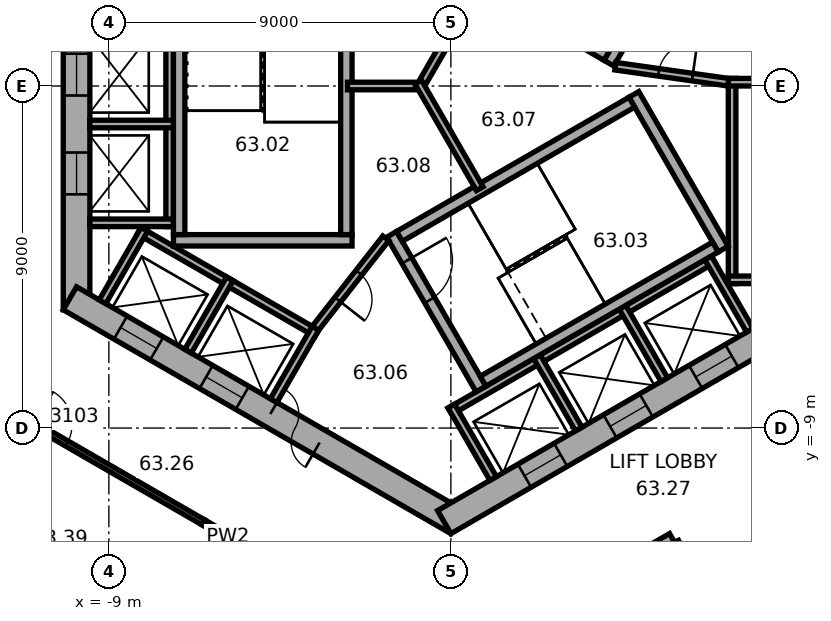
"""IFC4 building model, lengths in metres.
Left out: names, types, materials, properties, quantities, classifications, styles, units other than length and angle.
Written with IfcOpenShell. Run it as: python <this file> out.ifc"""

import sys

from ifc_helpers import new_model, si_unit, direction, frame, frame_2d, origin, place, context, subcontext, project, spatial, rectangle, extrude, element, fill, save


model = new_model("IFC4")
c1 = context("Model", 3, precision=1e-05, world=origin(), true_north=direction((0.0, 1.0)))
c2 = subcontext(c1, "Body", "Model", "MODEL_VIEW")
j1 = project(units=[si_unit("LENGTHUNIT", "METRE"), si_unit("PLANEANGLEUNIT", "RADIAN")], contexts=[c1])
p1 = place(None, origin())
s1 = spatial("IfcSite", under=j1, at=p1, CompositionType="ELEMENT")
p2 = place(p1, origin())
s2 = spatial("IfcBuilding", under=s1, at=p2, CompositionType="ELEMENT")
p3 = place(p2, frame((0.0, 0.0, 255.0)))
s3 = spatial("IfcBuildingStorey", under=s2, at=p3, CompositionType="ELEMENT", Elevation=255.0)
p4 = place(p3, frame((-9.85, 5.889, 0.0), z_axis=(0.0, 0.0, 1.0), x_axis=(0.0, -1.0, 0.0)))
e1 = element("IfcWall", 1, at=p4, inside=s3, PredefinedType="SHEAR", context=c2, shape_type="SweptSolid", body=[
    extrude(rectangle(XDim=11.778, YDim=0.7, at=frame_2d((5.889, 0.0))), origin(), (0.0, 0.0, 1.0), 4.8),
])
p5 = place(p4, frame((5.039, 0.0, 0.0)))
e2 = element("IfcOpeningElement", 2, at=p5, cuts=e1, PredefinedType="OPENING", context=c2, shape_type="SweptSolid", body=[
    extrude(rectangle(XDim=1.1, YDim=2.1, at=frame_2d((0.55, 1.05))), frame((0.0, 0.36, 0.0), z_axis=(0.0, -1.0, 0.0), x_axis=(1.0, 0.0, 0.0)), (0.0, 0.0, 1.0), 0.72),
])
p6 = place(p4, frame((7.639, 0.0, 0.0)))
e3 = element("IfcOpeningElement", 3, at=p6, cuts=e1, PredefinedType="OPENING", context=c2, shape_type="SweptSolid", body=[
    extrude(rectangle(XDim=1.1, YDim=2.1, at=frame_2d((0.55, 1.05))), frame((0.0, 0.36, 0.0), z_axis=(0.0, -1.0, 0.0), x_axis=(1.0, 0.0, 0.0)), (0.0, 0.0, 1.0), 0.72),
])
p7 = place(p3, frame((-10.025, -5.586, 0.0), z_axis=(0.0, 0.0, 1.0), x_axis=(0.866026453023, -0.499998182661, 0.0)))
e4 = element("IfcWall", 4, at=p7, inside=s3, PredefinedType="SHEAR", context=c2, shape_type="SweptSolid", body=[
    extrude(rectangle(XDim=11.778, YDim=0.7, at=frame_2d((5.889, 0.0))), origin(), (0.0, 0.0, 1.0), 4.8),
])
p8 = place(p7, frame((6.089, 0.0, 0.0)))
e5 = element("IfcOpeningElement", 5, at=p8, cuts=e4, PredefinedType="OPENING", context=c2, shape_type="SweptSolid", body=[
    extrude(rectangle(XDim=1.5, YDim=2.1, at=frame_2d((0.75, 1.05))), frame((0.0, 0.36, 0.0), z_axis=(0.0, -1.0, 0.0), x_axis=(1.0, 0.0, 0.0)), (0.0, 0.0, 1.0), 0.72),
])
p9 = place(p7, frame((1.539, 0.0, 0.0)))
e6 = element("IfcOpeningElement", 6, at=p9, cuts=e4, PredefinedType="OPENING", context=c2, shape_type="SweptSolid", body=[
    extrude(rectangle(XDim=1.1, YDim=2.1, at=frame_2d((0.55, 1.05))), frame((0.0, 0.36, 0.0), z_axis=(0.0, -1.0, 0.0), x_axis=(1.0, 0.0, 0.0)), (0.0, 0.0, 1.0), 0.72),
])
p10 = place(p7, frame((4.139, 0.0, 0.0)))
e7 = element("IfcOpeningElement", 7, at=p10, cuts=e4, PredefinedType="OPENING", context=c2, shape_type="SweptSolid", body=[
    extrude(rectangle(XDim=1.1, YDim=2.1, at=frame_2d((0.55, 1.05))), frame((0.0, 0.36, 0.0), z_axis=(0.0, -1.0, 0.0), x_axis=(1.0, 0.0, 0.0)), (0.0, 0.0, 1.0), 0.72),
])
p11 = place(p3, frame((-0.175, -11.475, 0.0), z_axis=(0.0, 0.0, 1.0), x_axis=(0.866026453023, 0.499998182661, 0.0)))
e8 = element("IfcWall", 8, at=p11, inside=s3, PredefinedType="SHEAR", context=c2, shape_type="SweptSolid", body=[
    extrude(rectangle(XDim=11.778, YDim=0.7, at=frame_2d((5.889, 0.0))), origin(), (0.0, 0.0, 1.0), 4.8),
])
p12 = place(p11, frame((2.439, 0.0, 0.0)))
e9 = element("IfcOpeningElement", 9, at=p12, cuts=e8, PredefinedType="OPENING", context=c2, shape_type="SweptSolid", body=[
    extrude(rectangle(XDim=1.1, YDim=2.1, at=frame_2d((0.55, 1.05))), frame((0.0, 0.36, 0.0), z_axis=(0.0, -1.0, 0.0), x_axis=(1.0, 0.0, 0.0)), (0.0, 0.0, 1.0), 0.72),
])
p13 = place(p11, frame((5.039, 0.0, 0.0)))
e10 = element("IfcOpeningElement", 10, at=p13, cuts=e8, PredefinedType="OPENING", context=c2, shape_type="SweptSolid", body=[
    extrude(rectangle(XDim=1.1, YDim=2.1, at=frame_2d((0.55, 1.05))), frame((0.0, 0.36, 0.0), z_axis=(0.0, -1.0, 0.0), x_axis=(1.0, 0.0, 0.0)), (0.0, 0.0, 1.0), 0.72),
])
p14 = place(p11, frame((7.639, 0.0, 0.0)))
e11 = element("IfcOpeningElement", 11, at=p14, cuts=e8, PredefinedType="OPENING", context=c2, shape_type="SweptSolid", body=[
    extrude(rectangle(XDim=1.1, YDim=2.1, at=frame_2d((0.55, 1.05))), frame((0.0, 0.36, 0.0), z_axis=(0.0, -1.0, 0.0), x_axis=(1.0, 0.0, 0.0)), (0.0, 0.0, 1.0), 0.72),
])
p15 = place(p3, frame((7.4, -5.2, 0.0), z_axis=(0.0, 0.0, 1.0), x_axis=(0.0, 1.0, 0.0)))
e12 = element("IfcWall", 12, at=p15, inside=s3, PredefinedType="PARTITIONING", context=c2, shape_type="SweptSolid", body=[
    extrude(rectangle(XDim=5.4, YDim=0.2, at=frame_2d((2.7, 0.0))), origin(), (0.0, 0.0, 1.0), 4.52),
])
for number, where, z_axis, x_axis in (
    (13, (7.3, -5.1, 0.0), (0.0, 0.0, 1.0), (1.0, 0.0, 0.0)),
    (14, (7.3, 0.1, 0.0), (0.0, 0.0, 1.0), (1.0, 0.0, 0.0)),
):
    element("IfcWall", number, at=place(p3, frame(where, z_axis=z_axis, x_axis=x_axis)), inside=s3, PredefinedType="PARTITIONING", context=c2, shape_type="SweptSolid", body=[
        extrude(rectangle(XDim=2.2, YDim=0.2, at=frame_2d((1.1, 0.0))), origin(), (0.0, 0.0, 1.0), 4.52),
    ])
p16 = place(p3, frame((-7.4, 4.3, 0.0), z_axis=(0.0, 0.0, 1.0), x_axis=(0.0, -1.0, 0.0)))
e15 = element("IfcWall", 15, at=p16, inside=s3, PredefinedType="PARTITIONING", context=c2, shape_type="SweptSolid", body=[
    extrude(rectangle(XDim=8.0, YDim=0.2, at=frame_2d((4.0, 0.0))), origin(), (0.0, 0.0, 1.0), 4.52),
])
for number, where, z_axis, x_axis in (
    (16, (-7.3, -1.0, 0.0), (0.0, 0.0, 1.0), (-1.0, 0.0, 0.0)),
    (17, (-7.3, -3.6, 0.0), (0.0, 0.0, 1.0), (-1.0, 0.0, 0.0)),
):
    element("IfcWall", number, at=place(p3, frame(where, z_axis=z_axis, x_axis=x_axis)), inside=s3, PredefinedType="PARTITIONING", context=c2, shape_type="SweptSolid", body=[
        extrude(rectangle(XDim=2.2, YDim=0.2, at=frame_2d((1.1, 0.0))), origin(), (0.0, 0.0, 1.0), 4.52),
    ])
p17 = place(p3, frame((-8.203, -3.809, 0.0), z_axis=(0.0, 0.0, 1.0), x_axis=(0.866028230842, -0.499995103361, 0.0)))
e18 = element("IfcWall", 18, at=p17, inside=s3, PredefinedType="PARTITIONING", context=c2, shape_type="SweptSolid", body=[
    extrude(rectangle(XDim=5.4, YDim=0.2, at=frame_2d((2.7, 0.0))), origin(), (0.0, 0.0, 1.0), 4.52),
])
for number, where, z_axis, x_axis in (
    (19, (-8.067, -3.772, 0.0), (0.0, 0.0, 1.0), (-0.5, -0.866, 0.0)),
    (20, (-5.815, -5.072, 0.0), (0.0, 0.0, 1.0), (-0.5, -0.866, 0.0)),
):
    element("IfcWall", number, at=place(p3, frame(where, z_axis=z_axis, x_axis=x_axis)), inside=s3, PredefinedType="PARTITIONING", context=c2, shape_type="SweptSolid", body=[
        extrude(rectangle(XDim=2.2, YDim=0.2, at=frame_2d((1.1, 0.0))), origin(), (0.0, 0.0, 1.0), 4.52),
    ])
p18 = place(p3, frame((-3.563, -6.372, 0.0), z_axis=(0.0, 0.0, 1.0), x_axis=(-0.499994660107, -0.866028486751, 0.0)))
e21 = element("IfcWall", 21, at=p18, inside=s3, PredefinedType="PARTITIONING", context=c2, shape_type="SweptSolid", body=[
    extrude(rectangle(XDim=2.2, YDim=0.2, at=frame_2d((1.1, 0.0))), origin(), (0.0, 0.0, 1.0), 4.52),
])
p19 = place(p3, frame((-0.024, -8.559, 0.0), z_axis=(0.0, 0.0, 1.0), x_axis=(0.866026010844, 0.49999894854, 0.0)))
e22 = element("IfcWall", 22, at=p19, inside=s3, PredefinedType="PARTITIONING", context=c2, shape_type="SweptSolid", body=[
    extrude(rectangle(XDim=8.0, YDim=0.2, at=frame_2d((4.0, 0.0))), origin(), (0.0, 0.0, 1.0), 4.52),
])
for number, where, z_axis, x_axis in (
    (23, (0.013, -8.422, 0.0), (0.0, 0.0, 1.0), (0.5, -0.866, 0.0)),
    (24, (2.264, -7.122, 0.0), (0.0, 0.0, 1.0), (0.5, -0.866, 0.0)),
    (25, (4.516, -5.822, 0.0), (0.0, 0.0, 1.0), (0.5, -0.866, 0.0)),
    (26, (6.768, -4.522, 0.0), (0.0, 0.0, 1.0), (0.5, -0.866, 0.0)),
):
    element("IfcWall", number, at=place(p3, frame(where, z_axis=z_axis, x_axis=x_axis)), inside=s3, PredefinedType="PARTITIONING", context=c2, shape_type="SweptSolid", body=[
        extrude(rectangle(XDim=2.2, YDim=0.2, at=frame_2d((1.1, 0.0))), origin(), (0.0, 0.0, 1.0), 4.52),
    ])
p20 = place(p3, frame((4.158, 0.602, 0.0), z_axis=(0.0, 0.0, 1.0), x_axis=(0.499977259774, 0.866038532462, 0.0)))
e27 = element("IfcWall", 27, at=p20, inside=s3, PredefinedType="SHEAR", context=c2, shape_type="SweptSolid", body=[
    extrude(rectangle(XDim=4.7, YDim=0.3, at=frame_2d((2.35, 0.0))), origin(), (0.0, 0.0, 1.0), 4.52),
])
p21 = place(p20, frame((0.8, 0.0, 0.0)))
e28 = element("IfcOpeningElement", 28, at=p21, cuts=e27, PredefinedType="OPENING", context=c2, shape_type="SweptSolid", body=[
    extrude(rectangle(XDim=1.2, YDim=2.1, at=frame_2d((0.6, 1.05))), frame((0.0, 0.16, 0.0), z_axis=(0.0, -1.0, 0.0), x_axis=(1.0, 0.0, 0.0)), (0.0, 0.0, 1.0), 0.32),
])
p22 = place(p3, frame((4.103, 0.807, 0.0), z_axis=(0.0, 0.0, 1.0), x_axis=(-0.866027801685, 0.499995846692, 0.0)))
e29 = element("IfcWall", 29, at=p22, inside=s3, PredefinedType="SHEAR", context=c2, shape_type="SweptSolid", body=[
    extrude(rectangle(XDim=7.06, YDim=0.3, at=frame_2d((3.53, 0.0))), origin(), (0.0, 0.0, 1.0), 4.52),
])
p23 = place(p3, frame((-2.6, -4.06, 0.0), z_axis=(0.0, 0.0, 1.0), x_axis=(-1.0, 0.0, 0.0)))
e30 = element("IfcWall", 30, at=p23, inside=s3, PredefinedType="SHEAR", context=c2, shape_type="SweptSolid", body=[
    extrude(rectangle(XDim=4.7, YDim=0.3, at=frame_2d((2.35, 0.0))), origin(), (0.0, 0.0, 1.0), 4.52),
])
for number, where, z_axis, x_axis in (
    (31, (-2.75, 3.15, 0.0), (0.0, 0.0, 1.0), (0.0, -1.0, 0.0)),
    (32, (-7.15, 3.15, 0.0), (0.0, 0.0, 1.0), (0.0, -1.0, 0.0)),
):
    element("IfcWall", number, at=place(p3, frame(where, z_axis=z_axis, x_axis=x_axis)), inside=s3, PredefinedType="SHEAR", context=c2, shape_type="SweptSolid", body=[
        extrude(rectangle(XDim=7.06, YDim=0.3, at=frame_2d((3.53, 0.0))), origin(), (0.0, 0.0, 1.0), 4.52),
    ])
p24 = place(p3, frame((-1.558, -3.902, 0.0), z_axis=(0.0, 0.0, 1.0), x_axis=(0.499977259774, -0.866038532462, 0.0)))
e33 = element("IfcWall", 33, at=p24, inside=s3, PredefinedType="SHEAR", context=c2, shape_type="SweptSolid", body=[
    extrude(rectangle(XDim=4.7, YDim=0.3, at=frame_2d((2.35, 0.0))), origin(), (0.0, 0.0, 1.0), 4.52),
])
p25 = place(p24, frame((0.8, 0.0, 0.0)))
e34 = element("IfcOpeningElement", 34, at=p25, cuts=e33, PredefinedType="OPENING", context=c2, shape_type="SweptSolid", body=[
    extrude(rectangle(XDim=1.2, YDim=2.1, at=frame_2d((0.6, 1.05))), frame((0.0, 0.16, 0.0), z_axis=(0.0, -1.0, 0.0), x_axis=(1.0, 0.0, 0.0)), (0.0, 0.0, 1.0), 0.32),
])
p26 = place(p3, frame((4.816, -0.222, 0.0), z_axis=(0.0, 0.0, 1.0), x_axis=(0.499977259774, -0.866038532462, 0.0)))
e35 = element("IfcWall", 35, at=p26, inside=s3, PredefinedType="SHEAR", context=c2, shape_type="SweptSolid", body=[
    extrude(rectangle(XDim=4.7, YDim=0.3, at=frame_2d((2.35, 0.0))), origin(), (0.0, 0.0, 1.0), 4.52),
])
for number, where, z_axis, x_axis in (
    (36, (-1.353, -3.957, 0.0), (0.0, 0.0, 1.0), (0.866, 0.5, 0.0)),
    (37, (0.847, -7.767, 0.0), (0.0, 0.0, 1.0), (0.866, 0.5, 0.0)),
):
    element("IfcWall", number, at=place(p3, frame(where, z_axis=z_axis, x_axis=x_axis)), inside=s3, PredefinedType="SHEAR", context=c2, shape_type="SweptSolid", body=[
        extrude(rectangle(XDim=7.06, YDim=0.3, at=frame_2d((3.53, 0.0))), origin(), (0.0, 0.0, 1.0), 4.52),
    ])
p27 = place(p3, frame((4.327, 0.521, 0.0), z_axis=(0.0, 0.0, 1.0), x_axis=(0.990124376366, -0.14019172346, 0.0)))
e38 = element("IfcWall", 38, at=p27, inside=s3, PredefinedType="PARTITIONING", context=c2, shape_type="SweptSolid", body=[
    extrude(rectangle(XDim=3.002, YDim=0.2, at=frame_2d((1.501, 0.0))), origin(), (0.0, 0.0, 1.0), 4.52),
])
p28 = place(p27, frame((1.15, 0.0, 0.0)))
e39 = element("IfcOpeningElement", 39, at=p28, cuts=e38, PredefinedType="OPENING", context=c2, shape_type="SweptSolid", body=[
    extrude(rectangle(XDim=0.9, YDim=2.1, at=frame_2d((0.45, 1.05))), frame((0.0, 0.11, 0.0), z_axis=(0.0, -1.0, 0.0), x_axis=(1.0, 0.0, 0.0)), (0.0, 0.0, 1.0), 0.22),
])
p29 = place(p3, frame((-1.712, -4.008, 0.0), z_axis=(0.0, 0.0, 1.0), x_axis=(-0.616549420702, -0.787316208287, 0.0)))
e40 = element("IfcWall", 40, at=p29, inside=s3, PredefinedType="PARTITIONING", context=c2, shape_type="SweptSolid", body=[
    extrude(rectangle(XDim=3.002, YDim=0.2, at=frame_2d((1.501, 0.0))), origin(), (0.0, 0.0, 1.0), 4.52),
])
p30 = place(p29, frame((1.15, 0.0, 0.0)))
e41 = element("IfcOpeningElement", 41, at=p30, cuts=e40, PredefinedType="OPENING", context=c2, shape_type="SweptSolid", body=[
    extrude(rectangle(XDim=0.9, YDim=2.1, at=frame_2d((0.45, 1.05))), frame((0.0, 0.11, 0.0), z_axis=(0.0, -1.0, 0.0), x_axis=(1.0, 0.0, 0.0)), (0.0, 0.0, 1.0), 0.22),
])
p31 = place(p3, frame((-0.68, 0.0, 0.0), z_axis=(0.0, 0.0, 1.0), x_axis=(-1.0, 0.0, 0.0)))
e42 = element("IfcWall", 42, at=p31, inside=s3, PredefinedType="PARTITIONING", context=c2, shape_type="SweptSolid", body=[
    extrude(rectangle(XDim=2.04, YDim=0.2, at=frame_2d((1.02, 0.0))), origin(), (0.0, 0.0, 1.0), 4.52),
])
for number, where, z_axis, x_axis in (
    (43, (-0.86, -0.104, 0.0), (0.0, 0.0, 1.0), (0.5, 0.866, 0.0)),
    (44, (-0.86, 0.104, 0.0), (0.0, 0.0, 1.0), (0.5, -0.866, 0.0)),
):
    element("IfcWall", number, at=place(p3, frame(where, z_axis=z_axis, x_axis=x_axis)), inside=s3, PredefinedType="PARTITIONING", context=c2, shape_type="SweptSolid", body=[
        extrude(rectangle(XDim=3.24, YDim=0.2, at=frame_2d((1.62, 0.0))), origin(), (0.0, 0.0, 1.0), 4.52),
    ])
p32 = place(p3, frame((-6.975, -16.411, 0.0), z_axis=(0.0, 0.0, 1.0), x_axis=(-0.866045613381, 0.499964994319, 0.0)))
e45 = element("IfcWall", 45, at=p32, inside=s3, PredefinedType="SOLIDWALL", context=c2, shape_type="SweptSolid", body=[
    extrude(rectangle(XDim=9.265, YDim=0.25, at=frame_2d((4.633, 0.0))), origin(), (0.0, 0.0, 1.0), 4.52),
])
p33 = place(p3, frame((7.799, -15.934, 0.0), z_axis=(0.0, 0.0, 1.0), x_axis=(-0.439688100098, 0.898150530052, 0.0)))
e46 = element("IfcWall", 46, at=p33, inside=s3, PredefinedType="SOLIDWALL", context=c2, shape_type="SweptSolid", body=[
    extrude(rectangle(XDim=4.369, YDim=0.25, at=frame_2d((2.185, 0.0))), origin(), (0.0, 0.0, 1.0), 3.6),
])
p34 = place(p3, frame((3.889, -12.997, 0.0), z_axis=(0.0, 0.0, 1.0), x_axis=(0.866026623601, 0.49999788721, 0.0)))
e47 = element("IfcWall", 47, at=p34, inside=s3, PredefinedType="SOLIDWALL", context=c2, shape_type="SweptSolid", body=[
    extrude(rectangle(XDim=2.225, YDim=0.25, at=frame_2d((1.113, 0.0))), origin(), (0.0, 0.0, 1.0), 4.52),
])
p35 = place(p3, frame((-6.513, -11.481, 0.0), z_axis=(0.0, 0.0, 1.0), x_axis=(0.866009279501, -0.500027927039, 0.0)))
e48 = element("IfcWall", 48, at=p35, inside=s3, PredefinedType="PARTITIONING", context=c2, shape_type="SweptSolid", body=[
    extrude(rectangle(XDim=1.499, YDim=0.15, at=frame_2d((0.75, 0.0))), origin(), (0.0, 0.0, 1.0), 4.52),
])
p36 = place(p3, frame((-11.186, -8.784, 0.0), z_axis=(0.0, 0.0, 1.0), x_axis=(0.866020546064, -0.500008413725, 0.0)))
e49 = element("IfcWall", 49, at=p36, inside=s3, PredefinedType="PARTITIONING", context=c2, shape_type="SweptSolid", body=[
    extrude(rectangle(XDim=5.395, YDim=0.15, at=frame_2d((2.698, 0.0))), origin(), (0.0, 0.0, 1.0), 4.52),
])
p37 = place(p36, frame((0.25, 0.0, 0.0)))
e50 = element("IfcOpeningElement", 50, at=p37, cuts=e49, PredefinedType="OPENING", context=c2, shape_type="SweptSolid", body=[
    extrude(rectangle(XDim=1.0, YDim=2.1, at=frame_2d((0.5, 1.05))), frame((0.0, 0.085, 0.0), z_axis=(0.0, -1.0, 0.0), x_axis=(1.0, 0.0, 0.0)), (0.0, 0.0, 1.0), 0.17),
])
p38 = place(p8, origin())
e51 = element("IfcDoor", 51, at=p38, inside=s3, OperationType="DOUBLE_DOOR_SINGLE_SWING", PredefinedType="DOOR", context=c2, shape_type="SweptSolid", body=[
    extrude(rectangle(XDim=1.5, YDim=2.1, at=frame_2d((0.75, 1.05))), frame((0.0, 0.025, 0.0), z_axis=(0.0, -1.0, 0.0), x_axis=(1.0, 0.0, 0.0)), (0.0, 0.0, 1.0), 0.05),
])
fill(e5, e51)
p39 = place(p25, origin())
e52 = element("IfcDoor", 52, at=p39, inside=s3, OperationType="SINGLE_SWING_RIGHT", PredefinedType="DOOR", context=c2, shape_type="SweptSolid", body=[
    extrude(rectangle(XDim=1.2, YDim=2.1, at=frame_2d((0.6, 1.05))), frame((0.0, 0.025, 0.0), z_axis=(0.0, -1.0, 0.0), x_axis=(1.0, 0.0, 0.0)), (0.0, 0.0, 1.0), 0.05),
])
fill(e34, e52)
p40 = place(p28, origin())
e53 = element("IfcDoor", 53, at=p40, inside=s3, OperationType="SINGLE_SWING_LEFT", PredefinedType="DOOR", context=c2, shape_type="SweptSolid", body=[
    extrude(rectangle(XDim=0.9, YDim=2.1, at=frame_2d((0.45, 1.05))), frame((0.0, 0.025, 0.0), z_axis=(0.0, -1.0, 0.0), x_axis=(1.0, 0.0, 0.0)), (0.0, 0.0, 1.0), 0.05),
])
fill(e39, e53)
p41 = place(p30, origin())
e54 = element("IfcDoor", 54, at=p41, inside=s3, OperationType="SINGLE_SWING_LEFT", PredefinedType="DOOR", context=c2, shape_type="SweptSolid", body=[
    extrude(rectangle(XDim=0.9, YDim=2.1, at=frame_2d((0.45, 1.05))), frame((0.0, 0.025, 0.0), z_axis=(0.0, -1.0, 0.0), x_axis=(1.0, 0.0, 0.0)), (0.0, 0.0, 1.0), 0.05),
])
fill(e41, e54)
p42 = place(p5, origin())
e55 = element("IfcDoor", 55, at=p42, inside=s3, OperationType="DOUBLE_DOOR_SLIDING", PredefinedType="DOOR", context=c2, shape_type="SweptSolid", body=[
    extrude(rectangle(XDim=1.1, YDim=2.1, at=frame_2d((0.55, 1.05))), frame((0.0, 0.025, 0.0), z_axis=(0.0, -1.0, 0.0), x_axis=(1.0, 0.0, 0.0)), (0.0, 0.0, 1.0), 0.05),
])
fill(e2, e55)
p43 = place(p6, origin())
e56 = element("IfcDoor", 56, at=p43, inside=s3, OperationType="DOUBLE_DOOR_SLIDING", PredefinedType="DOOR", context=c2, shape_type="SweptSolid", body=[
    extrude(rectangle(XDim=1.1, YDim=2.1, at=frame_2d((0.55, 1.05))), frame((0.0, 0.025, 0.0), z_axis=(0.0, -1.0, 0.0), x_axis=(1.0, 0.0, 0.0)), (0.0, 0.0, 1.0), 0.05),
])
fill(e3, e56)
p44 = place(p9, origin())
e57 = element("IfcDoor", 57, at=p44, inside=s3, OperationType="DOUBLE_DOOR_SLIDING", PredefinedType="DOOR", context=c2, shape_type="SweptSolid", body=[
    extrude(rectangle(XDim=1.1, YDim=2.1, at=frame_2d((0.55, 1.05))), frame((0.0, 0.025, 0.0), z_axis=(0.0, -1.0, 0.0), x_axis=(1.0, 0.0, 0.0)), (0.0, 0.0, 1.0), 0.05),
])
fill(e6, e57)
p45 = place(p10, origin())
e58 = element("IfcDoor", 58, at=p45, inside=s3, OperationType="DOUBLE_DOOR_SLIDING", PredefinedType="DOOR", context=c2, shape_type="SweptSolid", body=[
    extrude(rectangle(XDim=1.1, YDim=2.1, at=frame_2d((0.55, 1.05))), frame((0.0, 0.025, 0.0), z_axis=(0.0, -1.0, 0.0), x_axis=(1.0, 0.0, 0.0)), (0.0, 0.0, 1.0), 0.05),
])
fill(e7, e58)
p46 = place(p12, origin())
e59 = element("IfcDoor", 59, at=p46, inside=s3, OperationType="DOUBLE_DOOR_SLIDING", PredefinedType="DOOR", context=c2, shape_type="SweptSolid", body=[
    extrude(rectangle(XDim=1.1, YDim=2.1, at=frame_2d((0.55, 1.05))), frame((0.0, 0.025, 0.0), z_axis=(0.0, -1.0, 0.0), x_axis=(1.0, 0.0, 0.0)), (0.0, 0.0, 1.0), 0.05),
])
fill(e9, e59)
p47 = place(p13, origin())
e60 = element("IfcDoor", 60, at=p47, inside=s3, OperationType="DOUBLE_DOOR_SLIDING", PredefinedType="DOOR", context=c2, shape_type="SweptSolid", body=[
    extrude(rectangle(XDim=1.1, YDim=2.1, at=frame_2d((0.55, 1.05))), frame((0.0, 0.025, 0.0), z_axis=(0.0, -1.0, 0.0), x_axis=(1.0, 0.0, 0.0)), (0.0, 0.0, 1.0), 0.05),
])
fill(e10, e60)
p48 = place(p14, origin())
e61 = element("IfcDoor", 61, at=p48, inside=s3, OperationType="DOUBLE_DOOR_SLIDING", PredefinedType="DOOR", context=c2, shape_type="SweptSolid", body=[
    extrude(rectangle(XDim=1.1, YDim=2.1, at=frame_2d((0.55, 1.05))), frame((0.0, 0.025, 0.0), z_axis=(0.0, -1.0, 0.0), x_axis=(1.0, 0.0, 0.0)), (0.0, 0.0, 1.0), 0.05),
])
fill(e11, e61)
p49 = place(p37, origin())
e62 = element("IfcDoor", 62, at=p49, inside=s3, OperationType="SINGLE_SWING_LEFT", PredefinedType="DOOR", context=c2, shape_type="SweptSolid", body=[
    extrude(rectangle(XDim=1.0, YDim=2.1, at=frame_2d((0.5, 1.05))), frame((0.0, 0.025, 0.0), z_axis=(0.0, -1.0, 0.0), x_axis=(1.0, 0.0, 0.0)), (0.0, 0.0, 1.0), 0.05),
])
fill(e50, e62)
save(model, sys.argv[1])
